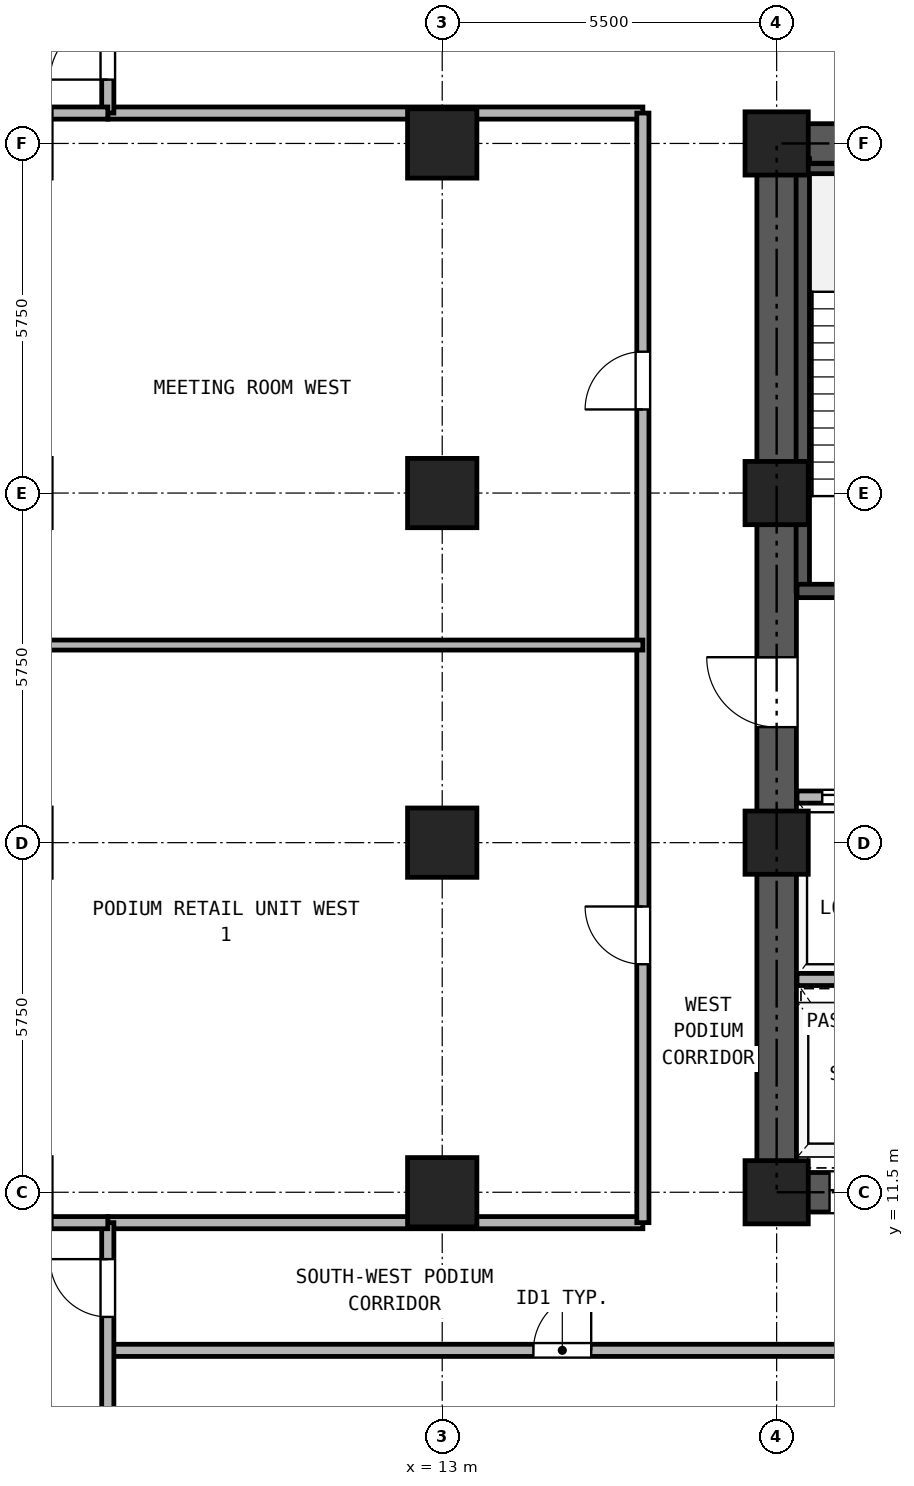
"""IFC4 building model, lengths in metres.
Left out: names, types, materials, properties, quantities, classifications, styles, units other than length and angle.
Written with IfcOpenShell. Run it as: python <this file> out.ifc"""

import sys

from ifc_helpers import new_model, si_unit, direction, frame, frame_2d, origin, origin_2d, place, context, subcontext, project, spatial, rectangle, hollow_rectangle, extrude, source, transform, mapped, element, fill, save


model = new_model("IFC4")
c1 = context("Model", 3, precision=1e-05, world=origin(), true_north=direction((0.0, 1.0)))
c2 = subcontext(c1, "Body", "Model", "MODEL_VIEW")
j1 = project(units=[si_unit("LENGTHUNIT", "METRE"), si_unit("PLANEANGLEUNIT", "RADIAN")], contexts=[c1])
p1 = place(None, origin())
s1 = spatial("IfcSite", under=j1, at=p1, CompositionType="ELEMENT")
p2 = place(p1, origin())
s2 = spatial("IfcBuilding", under=s1, at=p2, CompositionType="ELEMENT")
p3 = place(p2, frame((0.0, 0.0, 9.0)))
s3 = spatial("IfcBuildingStorey", under=s2, at=p3, CompositionType="ELEMENT", Elevation=9.0)
m1 = source(origin(), c2, "Body", "SweptSolid", [
    extrude(hollow_rectangle(XDim=1.14, YDim=1.14, WallThickness=0.07, at=origin_2d()), origin(), (0.0, 0.0, 1.0), 4.18),
])
for number, where, z_axis, x_axis in (
    (1, (13.0, 11.5, 0.0), (0.0, 0.0, 1.0), (1.0, 0.0, 0.0)),
    (2, (13.0, 17.25, 0.0), (0.0, 0.0, 1.0), (1.0, 0.0, 0.0)),
    (3, (13.0, 23.0, 0.0), (0.0, 0.0, 1.0), (1.0, 0.0, 0.0)),
    (4, (13.0, 28.75, 0.0), (0.0, 0.0, 1.0), (1.0, 0.0, 0.0)),
):
    element("IfcColumn", number, at=place(p3, frame(where, z_axis=z_axis, x_axis=x_axis)), inside=s3, PredefinedType="COLUMN", context=c2, shape_type="MappedRepresentation", body=[
        mapped(m1, transform((0.0, 0.0, 0.0), x_axis=(1.0, 0.0, 0.0), y_axis=(0.0, 1.0, 0.0), z_axis=(0.0, 0.0, 1.0), scale=1.0)),
    ])
m2 = source(origin(), c2, "Body", "SweptSolid", [
    extrude(hollow_rectangle(XDim=1.04, YDim=1.04, WallThickness=0.065, at=origin_2d()), origin(), (0.0, 0.0, 1.0), 4.18),
])
for number, where, z_axis, x_axis in (
    (5, (18.5, 11.5, 0.0), (0.0, 0.0, 1.0), (1.0, 0.0, 0.0)),
    (6, (18.5, 17.25, 0.0), (0.0, 0.0, 1.0), (1.0, 0.0, 0.0)),
    (7, (18.5, 23.0, 0.0), (0.0, 0.0, 1.0), (1.0, 0.0, 0.0)),
    (8, (18.5, 28.75, 0.0), (0.0, 0.0, 1.0), (1.0, 0.0, 0.0)),
):
    element("IfcColumn", number, at=place(p3, frame(where, z_axis=z_axis, x_axis=x_axis)), inside=s3, PredefinedType="COLUMN", context=c2, shape_type="MappedRepresentation", body=[
        mapped(m2, transform((0.0, 0.0, 0.0), x_axis=(1.0, 0.0, 0.0), y_axis=(0.0, 1.0, 0.0), z_axis=(0.0, 0.0, 1.0), scale=1.0)),
    ])
p4 = place(p3, frame((18.175, 11.5, 0.0), z_axis=(0.0, 0.0, 1.0), x_axis=(1.0, 0.0, 0.0)))
e9 = element("IfcWall", 9, at=p4, inside=s3, PredefinedType="SHEAR", context=c2, shape_type="SweptSolid", body=[
    extrude(rectangle(XDim=10.65, YDim=0.65, at=frame_2d((5.325, 0.0))), origin(), (0.0, 0.0, 1.0), 4.18),
])
p5 = place(p4, frame((1.195, 0.0, 0.0)))
e10 = element("IfcOpeningElement", 10, at=p5, cuts=e9, PredefinedType="OPENING", context=c2, shape_type="SweptSolid", body=[
    extrude(rectangle(XDim=1.1, YDim=2.25, at=frame_2d((0.55, 1.125))), frame((0.0, 0.335, 0.0), z_axis=(0.0, -1.0, 0.0), x_axis=(1.0, 0.0, 0.0)), (0.0, 0.0, 1.0), 0.67),
])
p6 = place(p4, frame((3.495, 0.0, 0.0)))
e11 = element("IfcOpeningElement", 11, at=p6, cuts=e9, PredefinedType="OPENING", context=c2, shape_type="SweptSolid", body=[
    extrude(rectangle(XDim=1.1, YDim=2.25, at=frame_2d((0.55, 1.125))), frame((0.0, 0.335, 0.0), z_axis=(0.0, -1.0, 0.0), x_axis=(1.0, 0.0, 0.0)), (0.0, 0.0, 1.0), 0.67),
])
p7 = place(p4, frame((5.925, 0.0, 0.0)))
e12 = element("IfcOpeningElement", 12, at=p7, cuts=e9, PredefinedType="OPENING", context=c2, shape_type="SweptSolid", body=[
    extrude(rectangle(XDim=1.1, YDim=2.25, at=frame_2d((0.55, 1.125))), frame((0.0, 0.335, 0.0), z_axis=(0.0, -1.0, 0.0), x_axis=(1.0, 0.0, 0.0)), (0.0, 0.0, 1.0), 0.67),
])
p8 = place(p4, frame((8.325, 0.0, 0.0)))
e13 = element("IfcOpeningElement", 13, at=p8, cuts=e9, PredefinedType="OPENING", context=c2, shape_type="SweptSolid", body=[
    extrude(rectangle(XDim=1.1, YDim=2.25, at=frame_2d((0.55, 1.125))), frame((0.0, 0.335, 0.0), z_axis=(0.0, -1.0, 0.0), x_axis=(1.0, 0.0, 0.0)), (0.0, 0.0, 1.0), 0.67),
])
p9 = place(p3, frame((18.175, 28.75, 0.0), z_axis=(0.0, 0.0, 1.0), x_axis=(1.0, 0.0, 0.0)))
e14 = element("IfcWall", 14, at=p9, inside=s3, PredefinedType="SHEAR", context=c2, shape_type="SweptSolid", body=[
    extrude(rectangle(XDim=10.65, YDim=0.65, at=frame_2d((5.325, 0.0))), origin(), (0.0, 0.0, 1.0), 4.18),
])
p10 = place(p9, frame((4.205, 0.0, 0.0)))
e15 = element("IfcOpeningElement", 15, at=p10, cuts=e14, PredefinedType="OPENING", context=c2, shape_type="SweptSolid", body=[
    extrude(rectangle(XDim=0.9, YDim=2.05, at=frame_2d((0.45, 1.025))), frame((0.0, 0.335, 0.0), z_axis=(0.0, -1.0, 0.0), x_axis=(1.0, 0.0, 0.0)), (0.0, 0.0, 1.0), 0.67),
])
p11 = place(p9, frame((5.745, 0.0, 0.0)))
e16 = element("IfcOpeningElement", 16, at=p11, cuts=e14, PredefinedType="OPENING", context=c2, shape_type="SweptSolid", body=[
    extrude(rectangle(XDim=0.9, YDim=2.05, at=frame_2d((0.45, 1.025))), frame((0.0, 0.335, 0.0), z_axis=(0.0, -1.0, 0.0), x_axis=(1.0, 0.0, 0.0)), (0.0, 0.0, 1.0), 0.67),
])
p12 = place(p3, frame((18.5, 11.825, 0.0), z_axis=(0.0, 0.0, 1.0), x_axis=(0.0, 1.0, 0.0)))
e17 = element("IfcWall", 17, at=p12, inside=s3, PredefinedType="SHEAR", context=c2, shape_type="SweptSolid", body=[
    extrude(rectangle(XDim=16.6, YDim=0.65, at=frame_2d((8.3, 0.0))), origin(), (0.0, 0.0, 1.0), 4.18),
])
p13 = place(p12, frame((7.325, 0.0, 0.0)))
e18 = element("IfcOpeningElement", 18, at=p13, cuts=e17, PredefinedType="OPENING", context=c2, shape_type="SweptSolid", body=[
    extrude(rectangle(XDim=1.15, YDim=2.2, at=frame_2d((0.575, 1.1))), frame((0.0, 0.335, 0.0), z_axis=(0.0, -1.0, 0.0), x_axis=(1.0, 0.0, 0.0)), (0.0, 0.0, 1.0), 0.67),
])
p14 = place(p3, frame((18.93, 21.39, 0.0), z_axis=(0.0, 0.0, 1.0), x_axis=(0.0, 1.0, 0.0)))
e19 = element("IfcWall", 19, at=p14, inside=s3, PredefinedType="SOLIDWALL", context=c2, shape_type="SweptSolid", body=[
    extrude(rectangle(XDim=7.11, YDim=0.22, at=frame_2d((3.555, 0.0))), origin(), (0.0, 0.0, 1.0), 4.18),
])
p15 = place(p3, frame((18.835, 28.335, 0.0), z_axis=(0.0, 0.0, 1.0), x_axis=(1.0, 0.0, 0.0)))
e20 = element("IfcWall", 20, at=p15, inside=s3, PredefinedType="PARTITIONING", context=c2, shape_type="SweptSolid", body=[
    extrude(rectangle(XDim=3.275, YDim=0.165, at=frame_2d((1.638, 0.0))), origin(), (0.0, 0.0, 1.0), 4.18),
])
p16 = place(p3, frame((18.835, 21.39, 0.0), z_axis=(0.0, 0.0, 1.0), x_axis=(1.0, 0.0, 0.0)))
e21 = element("IfcWall", 21, at=p16, inside=s3, PredefinedType="SOLIDWALL", context=c2, shape_type="SweptSolid", body=[
    extrude(rectangle(XDim=6.295, YDim=0.22, at=frame_2d((3.147, 0.0))), origin(), (0.0, 0.0, 1.0), 4.18),
])
p17 = place(p16, frame((1.015, 0.0, 0.0)))
e22 = element("IfcOpeningElement", 22, at=p17, cuts=e21, PredefinedType="OPENING", context=c2, shape_type="SweptSolid", body=[
    extrude(rectangle(XDim=1.15, YDim=2.2, at=frame_2d((0.575, 1.1))), frame((0.0, 0.12, 0.0), z_axis=(0.0, -1.0, 0.0), x_axis=(1.0, 0.0, 0.0)), (0.0, 0.0, 1.0), 0.24),
])
p18 = place(p16, frame((4.745, 0.0, 0.0)))
e23 = element("IfcOpeningElement", 23, at=p18, cuts=e21, PredefinedType="OPENING", context=c2, shape_type="SweptSolid", body=[
    extrude(rectangle(XDim=1.1, YDim=2.25, at=frame_2d((0.55, 1.125))), frame((0.0, 0.12, 0.0), z_axis=(0.0, -1.0, 0.0), x_axis=(1.0, 0.0, 0.0)), (0.0, 0.0, 1.0), 0.24),
])
p19 = place(p3, frame((18.835, 18.0, 0.0), z_axis=(0.0, 0.0, 1.0), x_axis=(1.0, 0.0, 0.0)))
e24 = element("IfcWall", 24, at=p19, inside=s3, PredefinedType="PARTITIONING", context=c2, shape_type="SweptSolid", body=[
    extrude(rectangle(XDim=9.33, YDim=0.2, at=frame_2d((4.665, 0.0))), origin(), (0.0, 0.0, 1.0), 4.18),
])
p20 = place(p19, frame((0.415, 0.0, 0.0)))
e25 = element("IfcOpeningElement", 25, at=p20, cuts=e24, PredefinedType="OPENING", context=c2, shape_type="SweptSolid", body=[
    extrude(rectangle(XDim=1.3, YDim=2.3, at=frame_2d((0.65, 1.15))), frame((0.0, 0.11, 0.0), z_axis=(0.0, -1.0, 0.0), x_axis=(1.0, 0.0, 0.0)), (0.0, 0.0, 1.0), 0.22),
])
p21 = place(p19, frame((2.515, 0.0, 0.0)))
e26 = element("IfcOpeningElement", 26, at=p21, cuts=e24, PredefinedType="OPENING", context=c2, shape_type="SweptSolid", body=[
    extrude(rectangle(XDim=1.3, YDim=2.3, at=frame_2d((0.65, 1.15))), frame((0.0, 0.11, 0.0), z_axis=(0.0, -1.0, 0.0), x_axis=(1.0, 0.0, 0.0)), (0.0, 0.0, 1.0), 0.22),
])
p22 = place(p19, frame((4.915, 0.0, 0.0)))
e27 = element("IfcOpeningElement", 27, at=p22, cuts=e24, PredefinedType="OPENING", context=c2, shape_type="SweptSolid", body=[
    extrude(rectangle(XDim=0.9, YDim=2.05, at=frame_2d((0.45, 1.025))), frame((0.0, 0.11, 0.0), z_axis=(0.0, -1.0, 0.0), x_axis=(1.0, 0.0, 0.0)), (0.0, 0.0, 1.0), 0.22),
])
p23 = place(p19, frame((7.615, 0.0, 0.0)))
e28 = element("IfcOpeningElement", 28, at=p23, cuts=e24, PredefinedType="OPENING", context=c2, shape_type="SweptSolid", body=[
    extrude(rectangle(XDim=0.9, YDim=2.05, at=frame_2d((0.45, 1.025))), frame((0.0, 0.11, 0.0), z_axis=(0.0, -1.0, 0.0), x_axis=(1.0, 0.0, 0.0)), (0.0, 0.0, 1.0), 0.22),
])
p24 = place(p3, frame((18.835, 15.0, 0.0), z_axis=(0.0, 0.0, 1.0), x_axis=(1.0, 0.0, 0.0)))
e29 = element("IfcWall", 29, at=p24, inside=s3, PredefinedType="PARTITIONING", context=c2, shape_type="SweptSolid", body=[
    extrude(rectangle(XDim=9.33, YDim=0.2, at=frame_2d((4.665, 0.0))), origin(), (0.0, 0.0, 1.0), 4.18),
])
p25 = place(p3, frame((7.5, 8.9, 0.0), z_axis=(0.0, 0.0, 1.0), x_axis=(1.0, 0.0, 0.0)))
e30 = element("IfcWall", 30, at=p25, inside=s3, PredefinedType="PARTITIONING", context=c2, shape_type="SweptSolid", body=[
    extrude(rectangle(XDim=32.0, YDim=0.2, at=frame_2d((16.0, 0.0))), origin(), (0.0, 0.0, 1.0), 4.18),
])
p26 = place(p25, frame((7.0, 0.0, 0.0)))
e31 = element("IfcOpeningElement", 31, at=p26, cuts=e30, PredefinedType="OPENING", context=c2, shape_type="SweptSolid", body=[
    extrude(rectangle(XDim=0.95, YDim=2.15, at=frame_2d((0.475, 1.075))), frame((0.0, 0.11, 0.0), z_axis=(0.0, -1.0, 0.0), x_axis=(1.0, 0.0, 0.0)), (0.0, 0.0, 1.0), 0.22),
])
p27 = place(p25, frame((19.5, 0.0, 0.0)))
e32 = element("IfcOpeningElement", 32, at=p27, cuts=e30, PredefinedType="OPENING", context=c2, shape_type="SweptSolid", body=[
    extrude(rectangle(XDim=0.95, YDim=2.15, at=frame_2d((0.475, 1.075))), frame((0.0, 0.11, 0.0), z_axis=(0.0, -1.0, 0.0), x_axis=(1.0, 0.0, 0.0)), (0.0, 0.0, 1.0), 0.22),
])
p28 = place(p25, frame((26.35, 0.0, 0.0)))
e33 = element("IfcOpeningElement", 33, at=p28, cuts=e30, PredefinedType="OPENING", context=c2, shape_type="SweptSolid", body=[
    extrude(rectangle(XDim=0.92, YDim=2.1, at=frame_2d((0.46, 1.05))), frame((0.0, 0.11, 0.0), z_axis=(0.0, -1.0, 0.0), x_axis=(1.0, 0.0, 0.0)), (0.0, 0.0, 1.0), 0.22),
])
p29 = place(p25, frame((29.85, 0.0, 0.0)))
e34 = element("IfcOpeningElement", 34, at=p29, cuts=e30, PredefinedType="OPENING", context=c2, shape_type="SweptSolid", body=[
    extrude(rectangle(XDim=0.92, YDim=2.1, at=frame_2d((0.46, 1.05))), frame((0.0, 0.11, 0.0), z_axis=(0.0, -1.0, 0.0), x_axis=(1.0, 0.0, 0.0)), (0.0, 0.0, 1.0), 0.22),
])
for number, where, z_axis, x_axis in (
    (35, (7.5, 11.0, 0.0), (0.0, 0.0, 1.0), (1.0, 0.0, 0.0)),
    (36, (7.5, 29.25, 0.0), (0.0, 0.0, 1.0), (1.0, 0.0, 0.0)),
):
    element("IfcWall", number, at=place(p3, frame(where, z_axis=z_axis, x_axis=x_axis)), inside=s3, PredefinedType="PARTITIONING", context=c2, shape_type="SweptSolid", body=[
        extrude(rectangle(XDim=8.8, YDim=0.2, at=frame_2d((4.4, 0.0))), origin(), (0.0, 0.0, 1.0), 4.18),
    ])
p30 = place(p3, frame((16.3, 11.0, 0.0), z_axis=(0.0, 0.0, 1.0), x_axis=(0.0, 1.0, 0.0)))
e37 = element("IfcWall", 37, at=p30, inside=s3, PredefinedType="PARTITIONING", context=c2, shape_type="SweptSolid", body=[
    extrude(rectangle(XDim=18.25, YDim=0.2, at=frame_2d((9.125, 0.0))), origin(), (0.0, 0.0, 1.0), 4.18),
])
p31 = place(p30, frame((4.25, 0.0, 0.0)))
e38 = element("IfcOpeningElement", 38, at=p31, cuts=e37, PredefinedType="OPENING", context=c2, shape_type="SweptSolid", body=[
    extrude(rectangle(XDim=0.95, YDim=2.15, at=frame_2d((0.475, 1.075))), frame((0.0, 0.11, 0.0), z_axis=(0.0, -1.0, 0.0), x_axis=(1.0, 0.0, 0.0)), (0.0, 0.0, 1.0), 0.22),
])
p32 = place(p30, frame((13.375, 0.0, 0.0)))
e39 = element("IfcOpeningElement", 39, at=p32, cuts=e37, PredefinedType="OPENING", context=c2, shape_type="SweptSolid", body=[
    extrude(rectangle(XDim=0.95, YDim=2.15, at=frame_2d((0.475, 1.075))), frame((0.0, 0.11, 0.0), z_axis=(0.0, -1.0, 0.0), x_axis=(1.0, 0.0, 0.0)), (0.0, 0.0, 1.0), 0.22),
])
p33 = place(p3, frame((7.5, 0.25, 0.0), z_axis=(0.0, 0.0, 1.0), x_axis=(0.0, 1.0, 0.0)))
e40 = element("IfcWall", 40, at=p33, inside=s3, PredefinedType="PARTITIONING", context=c2, shape_type="SweptSolid", body=[
    extrude(rectangle(XDim=10.75, YDim=0.2, at=frame_2d((5.375, 0.0))), origin(), (0.0, 0.0, 1.0), 4.18),
])
p34 = place(p33, frame((9.2, 0.0, 0.0)))
e41 = element("IfcOpeningElement", 41, at=p34, cuts=e40, PredefinedType="OPENING", context=c2, shape_type="SweptSolid", body=[
    extrude(rectangle(XDim=0.95, YDim=2.15, at=frame_2d((0.475, 1.075))), frame((0.0, 0.11, 0.0), z_axis=(0.0, -1.0, 0.0), x_axis=(1.0, 0.0, 0.0)), (0.0, 0.0, 1.0), 0.22),
])
p35 = place(p3, frame((7.5, 29.25, 0.0), z_axis=(0.0, 0.0, 1.0), x_axis=(0.0, 1.0, 0.0)))
e42 = element("IfcWall", 42, at=p35, inside=s3, PredefinedType="PARTITIONING", context=c2, shape_type="SweptSolid", body=[
    extrude(rectangle(XDim=11.0, YDim=0.2, at=frame_2d((5.5, 0.0))), origin(), (0.0, 0.0, 1.0), 4.18),
])
p36 = place(p35, frame((0.55, 0.0, 0.0)))
e43 = element("IfcOpeningElement", 43, at=p36, cuts=e42, PredefinedType="OPENING", context=c2, shape_type="SweptSolid", body=[
    extrude(rectangle(XDim=0.95, YDim=2.15, at=frame_2d((0.475, 1.075))), frame((0.0, 0.11, 0.0), z_axis=(0.0, -1.0, 0.0), x_axis=(1.0, 0.0, 0.0)), (0.0, 0.0, 1.0), 0.22),
])
for number, where, z_axis, x_axis in (
    (44, (0.25, 11.0, 0.0), (0.0, 0.0, 1.0), (1.0, 0.0, 0.0)),
    (45, (0.25, 29.25, 0.0), (0.0, 0.0, 1.0), (1.0, 0.0, 0.0)),
):
    element("IfcWall", number, at=place(p3, frame(where, z_axis=z_axis, x_axis=x_axis)), inside=s3, PredefinedType="PARTITIONING", context=c2, shape_type="SweptSolid", body=[
        extrude(rectangle(XDim=7.25, YDim=0.2, at=frame_2d((3.625, 0.0))), origin(), (0.0, 0.0, 1.0), 4.18),
    ])
p37 = place(p3, frame((0.25, 20.5, 0.0), z_axis=(0.0, 0.0, 1.0), x_axis=(1.0, 0.0, 0.0)))
e46 = element("IfcWall", 46, at=p37, inside=s3, PredefinedType="PARTITIONING", context=c2, shape_type="SweptSolid", body=[
    extrude(rectangle(XDim=16.05, YDim=0.165, at=frame_2d((8.025, 0.0))), origin(), (0.0, 0.0, 1.0), 4.18),
])
p38 = place(p20, origin())
e47 = element("IfcDoor", 47, at=p38, inside=s3, OperationType="DOUBLE_DOOR_SLIDING", PredefinedType="DOOR", context=c2, shape_type="SweptSolid", body=[
    extrude(rectangle(XDim=1.3, YDim=2.3, at=frame_2d((0.65, 1.15))), frame((0.0, 0.025, 0.0), z_axis=(0.0, -1.0, 0.0), x_axis=(1.0, 0.0, 0.0)), (0.0, 0.0, 1.0), 0.05),
])
fill(e25, e47)
p39 = place(p13, frame((1.15, 0.0, 0.0), z_axis=(0.0, 0.0, 1.0), x_axis=(-1.0, 0.0, 0.0)))
e48 = element("IfcDoor", 48, at=p39, inside=s3, OperationType="SINGLE_SWING_RIGHT", PredefinedType="DOOR", context=c2, shape_type="SweptSolid", body=[
    extrude(rectangle(XDim=1.15, YDim=2.2, at=frame_2d((0.575, 1.1))), frame((0.0, 0.025, 0.0), z_axis=(0.0, -1.0, 0.0), x_axis=(1.0, 0.0, 0.0)), (0.0, 0.0, 1.0), 0.05),
])
fill(e18, e48)
p40 = place(p5, frame((1.1, 0.0, 0.0), z_axis=(0.0, 0.0, 1.0), x_axis=(-1.0, 0.0, 0.0)))
e49 = element("IfcDoor", 49, at=p40, inside=s3, OperationType="DOUBLE_DOOR_SLIDING", PredefinedType="DOOR", context=c2, shape_type="SweptSolid", body=[
    extrude(rectangle(XDim=1.1, YDim=2.25, at=frame_2d((0.55, 1.125))), frame((0.0, 0.025, 0.0), z_axis=(0.0, -1.0, 0.0), x_axis=(1.0, 0.0, 0.0)), (0.0, 0.0, 1.0), 0.05),
])
fill(e10, e49)
p41 = place(p26, frame((0.95, 0.0, 0.0), z_axis=(0.0, 0.0, 1.0), x_axis=(-1.0, 0.0, 0.0)))
e50 = element("IfcDoor", 50, at=p41, inside=s3, OperationType="SINGLE_SWING_RIGHT", PredefinedType="DOOR", context=c2, shape_type="SweptSolid", body=[
    extrude(rectangle(XDim=0.95, YDim=2.15, at=frame_2d((0.475, 1.075))), frame((0.0, 0.025, 0.0), z_axis=(0.0, -1.0, 0.0), x_axis=(1.0, 0.0, 0.0)), (0.0, 0.0, 1.0), 0.05),
])
fill(e31, e50)
p42 = place(p34, frame((0.95, 0.0, 0.0), z_axis=(0.0, 0.0, 1.0), x_axis=(-1.0, 0.0, 0.0)))
e51 = element("IfcDoor", 51, at=p42, inside=s3, OperationType="SINGLE_SWING_RIGHT", PredefinedType="DOOR", context=c2, shape_type="SweptSolid", body=[
    extrude(rectangle(XDim=0.95, YDim=2.15, at=frame_2d((0.475, 1.075))), frame((0.0, 0.025, 0.0), z_axis=(0.0, -1.0, 0.0), x_axis=(1.0, 0.0, 0.0)), (0.0, 0.0, 1.0), 0.05),
])
fill(e41, e51)
p43 = place(p36, frame((0.95, 0.0, 0.0), z_axis=(0.0, 0.0, 1.0), x_axis=(-1.0, 0.0, 0.0)))
e52 = element("IfcDoor", 52, at=p43, inside=s3, OperationType="SINGLE_SWING_LEFT", PredefinedType="DOOR", context=c2, shape_type="SweptSolid", body=[
    extrude(rectangle(XDim=0.95, YDim=2.15, at=frame_2d((0.475, 1.075))), frame((0.0, 0.025, 0.0), z_axis=(0.0, -1.0, 0.0), x_axis=(1.0, 0.0, 0.0)), (0.0, 0.0, 1.0), 0.05),
])
fill(e43, e52)
p44 = place(p31, frame((0.95, 0.0, 0.0), z_axis=(0.0, 0.0, 1.0), x_axis=(-1.0, 0.0, 0.0)))
e53 = element("IfcDoor", 53, at=p44, inside=s3, OperationType="SINGLE_SWING_RIGHT", PredefinedType="DOOR", context=c2, shape_type="SweptSolid", body=[
    extrude(rectangle(XDim=0.95, YDim=2.15, at=frame_2d((0.475, 1.075))), frame((0.0, 0.025, 0.0), z_axis=(0.0, -1.0, 0.0), x_axis=(1.0, 0.0, 0.0)), (0.0, 0.0, 1.0), 0.05),
])
fill(e38, e53)
p45 = place(p32, frame((0.95, 0.0, 0.0), z_axis=(0.0, 0.0, 1.0), x_axis=(-1.0, 0.0, 0.0)))
e54 = element("IfcDoor", 54, at=p45, inside=s3, OperationType="SINGLE_SWING_LEFT", PredefinedType="DOOR", context=c2, shape_type="SweptSolid", body=[
    extrude(rectangle(XDim=0.95, YDim=2.15, at=frame_2d((0.475, 1.075))), frame((0.0, 0.025, 0.0), z_axis=(0.0, -1.0, 0.0), x_axis=(1.0, 0.0, 0.0)), (0.0, 0.0, 1.0), 0.05),
])
fill(e39, e54)
save(model, sys.argv[1])
